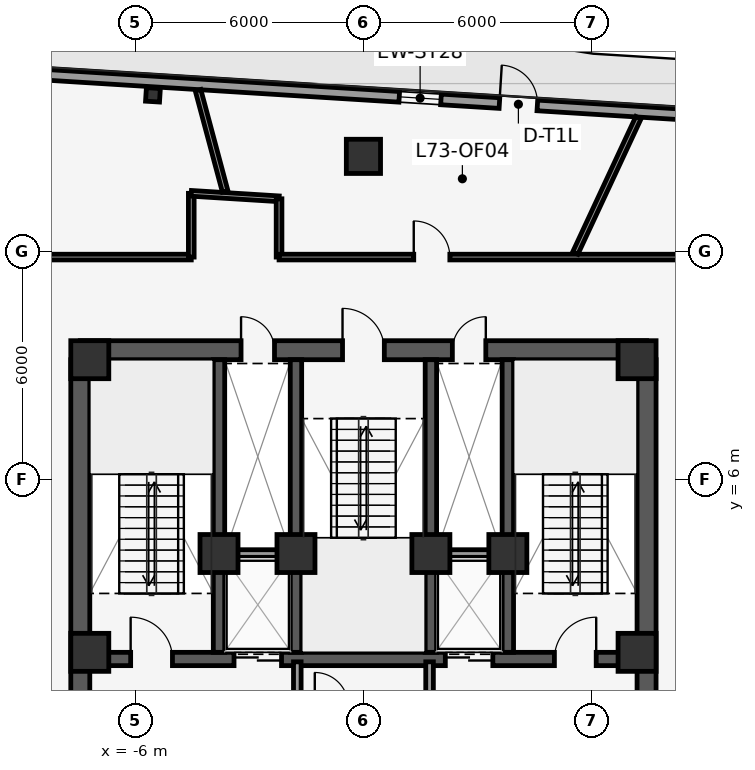
"""IFC4 building model, lengths in metres.
Left out: names, types, materials, properties, quantities, classifications, styles, units other than length and angle.
Written with IfcOpenShell. Run it as: python <this file> out.ifc"""

import sys

from ifc_helpers import new_model, si_unit, direction, frame, frame_2d, origin, origin_2d, place, context, subcontext, project, spatial, rectangle, i_section, extrude, element, fill, save


model = new_model("IFC4")
c1 = context("Model", 3, precision=1e-05, world=origin(), true_north=direction((0.0, 1.0)))
c2 = subcontext(c1, "Body", "Model", "MODEL_VIEW")
j1 = project(units=[si_unit("LENGTHUNIT", "METRE"), si_unit("PLANEANGLEUNIT", "RADIAN")], contexts=[c1])
p1 = place(None, origin())
s1 = spatial("IfcSite", under=j1, at=p1, CompositionType="ELEMENT")
p2 = place(p1, origin())
s2 = spatial("IfcBuilding", under=s1, at=p2, CompositionType="ELEMENT")
p3 = place(p2, frame((0.0, 0.0, 310.6)))
s3 = spatial("IfcBuildingStorey", under=s2, at=p3, CompositionType="ELEMENT", Elevation=310.6)
p4 = place(p3, frame((-7.45, 9.4, 0.0), z_axis=(0.0, 0.0, 1.0), x_axis=(1.0, 0.0, 0.0)))
e1 = element("IfcWall", 1, at=p4, inside=s3, PredefinedType="SHEAR", context=c2, shape_type="SweptSolid", body=[
    extrude(rectangle(XDim=14.9, YDim=0.5, at=frame_2d((7.45, 0.0))), origin(), (0.0, 0.0, 1.0), 3.85),
])
p5 = place(p4, frame((6.9, 0.0, 0.0)))
e2 = element("IfcOpeningElement", 2, at=p5, cuts=e1, PredefinedType="OPENING", context=c2, shape_type="SweptSolid", body=[
    extrude(rectangle(XDim=1.1, YDim=2.15, at=frame_2d((0.55, 1.075))), frame((0.0, 0.26, 0.0), z_axis=(0.0, -1.0, 0.0), x_axis=(1.0, 0.0, 0.0)), (0.0, 0.0, 1.0), 0.52),
])
p6 = place(p4, frame((4.23, 0.0, 0.0)))
e3 = element("IfcOpeningElement", 3, at=p6, cuts=e1, PredefinedType="OPENING", context=c2, shape_type="SweptSolid", body=[
    extrude(rectangle(XDim=0.88, YDim=2.15, at=frame_2d((0.44, 1.075))), frame((0.0, 0.26, 0.0), z_axis=(0.0, -1.0, 0.0), x_axis=(1.0, 0.0, 0.0)), (0.0, 0.0, 1.0), 0.52),
])
p7 = place(p4, frame((9.79, 0.0, 0.0)))
e4 = element("IfcOpeningElement", 4, at=p7, cuts=e1, PredefinedType="OPENING", context=c2, shape_type="SweptSolid", body=[
    extrude(rectangle(XDim=0.88, YDim=2.15, at=frame_2d((0.44, 1.075))), frame((0.0, 0.26, 0.0), z_axis=(0.0, -1.0, 0.0), x_axis=(1.0, 0.0, 0.0)), (0.0, 0.0, 1.0), 0.52),
])
p8 = place(p3, frame((-7.2, 1.275, 0.0), z_axis=(0.0, 0.0, 1.0), x_axis=(1.0, 0.0, 0.0)))
e5 = element("IfcWall", 5, at=p8, inside=s3, PredefinedType="SHEAR", context=c2, shape_type="SweptSolid", body=[
    extrude(rectangle(XDim=14.4, YDim=0.35, at=frame_2d((7.2, 0.0))), origin(), (0.0, 0.0, 1.0), 3.85),
])
p9 = place(p8, frame((3.795, 0.0, 0.0)))
e6 = element("IfcOpeningElement", 6, at=p9, cuts=e5, PredefinedType="OPENING", context=c2, shape_type="SweptSolid", body=[
    extrude(rectangle(XDim=1.25, YDim=2.25, at=frame_2d((0.625, 1.125))), frame((0.0, 0.185, 0.0), z_axis=(0.0, -1.0, 0.0), x_axis=(1.0, 0.0, 0.0)), (0.0, 0.0, 1.0), 0.37),
])
p10 = place(p8, frame((9.355, 0.0, 0.0)))
e7 = element("IfcOpeningElement", 7, at=p10, cuts=e5, PredefinedType="OPENING", context=c2, shape_type="SweptSolid", body=[
    extrude(rectangle(XDim=1.25, YDim=2.25, at=frame_2d((0.625, 1.125))), frame((0.0, 0.185, 0.0), z_axis=(0.0, -1.0, 0.0), x_axis=(1.0, 0.0, 0.0)), (0.0, 0.0, 1.0), 0.37),
])
p11 = place(p8, frame((1.075, 0.0, 0.0)))
e8 = element("IfcOpeningElement", 8, at=p11, cuts=e5, PredefinedType="OPENING", context=c2, shape_type="SweptSolid", body=[
    extrude(rectangle(XDim=1.1, YDim=2.15, at=frame_2d((0.55, 1.075))), frame((0.0, 0.185, 0.0), z_axis=(0.0, -1.0, 0.0), x_axis=(1.0, 0.0, 0.0)), (0.0, 0.0, 1.0), 0.37),
])
p12 = place(p8, frame((12.225, 0.0, 0.0)))
e9 = element("IfcOpeningElement", 9, at=p12, cuts=e5, PredefinedType="OPENING", context=c2, shape_type="SweptSolid", body=[
    extrude(rectangle(XDim=1.1, YDim=2.15, at=frame_2d((0.55, 1.075))), frame((0.0, 0.185, 0.0), z_axis=(0.0, -1.0, 0.0), x_axis=(1.0, 0.0, 0.0)), (0.0, 0.0, 1.0), 0.37),
])
for number, where, z_axis, x_axis in (
    (10, (-3.8, 1.45, 0.0), (0.0, 0.0, 1.0), (0.0, 1.0, 0.0)),
    (11, (-1.775, 1.45, 0.0), (0.0, 0.0, 1.0), (0.0, 1.0, 0.0)),
    (12, (1.775, 1.45, 0.0), (0.0, 0.0, 1.0), (0.0, 1.0, 0.0)),
    (13, (3.8, 1.45, 0.0), (0.0, 0.0, 1.0), (0.0, 1.0, 0.0)),
):
    element("IfcWall", number, at=place(p3, frame(where, z_axis=z_axis, x_axis=x_axis)), inside=s3, PredefinedType="SHEAR", context=c2, shape_type="SweptSolid", body=[
        extrude(rectangle(XDim=7.7, YDim=0.3, at=frame_2d((3.85, 0.0))), origin(), (0.0, 0.0, 1.0), 3.85),
    ])
for number, where, z_axis, x_axis in (
    (14, (-7.45, 0.1, 0.0), (0.0, 0.0, 1.0), (0.0, 1.0, 0.0)),
    (15, (7.45, 0.1, 0.0), (0.0, 0.0, 1.0), (0.0, 1.0, 0.0)),
):
    element("IfcWall", number, at=place(p3, frame(where, z_axis=z_axis, x_axis=x_axis)), inside=s3, PredefinedType="SHEAR", context=c2, shape_type="SweptSolid", body=[
        extrude(rectangle(XDim=9.05, YDim=0.5, at=frame_2d((4.525, 0.0))), origin(), (0.0, 0.0, 1.0), 3.85),
    ])
for number, where, z_axis, x_axis in (
    (16, (7.2, 1.45, 0.0), (0.0, 0.0, 1.0), (1.0, 0.0, 0.0)),
    (17, (7.2, 9.15, 0.0), (0.0, 0.0, 1.0), (1.0, 0.0, 0.0)),
    (18, (-7.2, 9.15, 0.0), (0.0, 0.0, 1.0), (1.0, 0.0, 0.0)),
    (19, (-7.2, 1.45, 0.0), (0.0, 0.0, 1.0), (1.0, 0.0, 0.0)),
    (20, (-3.8, 4.05, 0.0), (0.0, 0.0, 1.0), (1.0, 0.0, 0.0)),
    (21, (3.8, 4.05, 0.0), (0.0, 0.0, 1.0), (1.0, 0.0, 0.0)),
    (22, (-1.775, 4.05, 0.0), (0.0, 0.0, 1.0), (1.0, 0.0, 0.0)),
    (23, (1.775, 4.05, 0.0), (0.0, 0.0, 1.0), (1.0, 0.0, 0.0)),
):
    element("IfcColumn", number, at=place(p3, frame(where, z_axis=z_axis, x_axis=x_axis)), inside=s3, PredefinedType="COLUMN", context=c2, shape_type="SweptSolid", body=[
        extrude(rectangle(XDim=1.0, YDim=1.0, at=origin_2d()), origin(), (0.0, 0.0, 1.0), 4.1),
    ])
p13 = place(p3, frame((0.0, 14.5, 0.0), z_axis=(0.0, 0.0, 1.0), x_axis=(1.0, 0.0, 0.0)))
e24 = element("IfcColumn", 24, at=p13, inside=s3, PredefinedType="COLUMN", context=c2, shape_type="SweptSolid", body=[
    extrude(rectangle(XDim=0.9, YDim=0.9, at=origin_2d()), origin(), (0.0, 0.0, 1.0), 4.1),
])
p14 = place(p3, frame((-5.538, 16.118, 0.0), z_axis=(0.0, 0.0, 1.0), x_axis=(-0.998081143466, 0.061919553109, 0.0)))
e25 = element("IfcColumn", 25, at=p14, inside=s3, PredefinedType="COLUMN", context=c2, shape_type="SweptSolid", body=[
    extrude(i_section(OverallWidth=0.368, OverallDepth=0.356, WebThickness=0.011, FlangeThickness=0.018, at=origin_2d()), origin(), (0.0, 0.0, 1.0), 4.1),
])
p15 = place(p3, frame((-20.056, 17.376, 0.0), z_axis=(0.0, 0.0, 1.0), x_axis=(0.998061236898, -0.06223959674, 0.0)))
e26 = element("IfcWall", 26, at=p15, inside=s3, PredefinedType="STANDARD", context=c2, shape_type="SweptSolid", body=[
    extrude(rectangle(XDim=43.18, YDim=0.28, at=frame_2d((21.59, 0.0))), origin(), (0.0, 0.0, 1.0), 3.85),
])
p16 = place(p15, frame((23.681, 0.0, 0.0)))
e27 = element("IfcOpeningElement", 27, at=p16, cuts=e26, PredefinedType="OPENING", context=c2, shape_type="SweptSolid", body=[
    extrude(rectangle(XDim=1.0, YDim=2.15, at=frame_2d((0.5, 1.075))), frame((0.0, 0.15, 0.0), z_axis=(0.0, -1.0, 0.0), x_axis=(1.0, 0.0, 0.0)), (0.0, 0.0, 1.0), 0.3),
])
p17 = place(p15, frame((4.24, 0.0, 0.85)))
e28 = element("IfcOpeningElement", 28, at=p17, cuts=e26, PredefinedType="OPENING", context=c2, shape_type="SweptSolid", body=[
    extrude(rectangle(XDim=1.1, YDim=2.15, at=frame_2d((0.55, 1.075))), frame((0.0, 0.15, 0.0), z_axis=(0.0, -1.0, 0.0), x_axis=(1.0, 0.0, 0.0)), (0.0, 0.0, 1.0), 0.3),
])
p18 = place(p15, frame((9.84, 0.0, 0.85)))
e29 = element("IfcOpeningElement", 29, at=p18, cuts=e26, PredefinedType="OPENING", context=c2, shape_type="SweptSolid", body=[
    extrude(rectangle(XDim=1.1, YDim=2.15, at=frame_2d((0.55, 1.075))), frame((0.0, 0.15, 0.0), z_axis=(0.0, -1.0, 0.0), x_axis=(1.0, 0.0, 0.0)), (0.0, 0.0, 1.0), 0.3),
])
p19 = place(p15, frame((21.04, 0.0, 0.85)))
e30 = element("IfcOpeningElement", 30, at=p19, cuts=e26, PredefinedType="OPENING", context=c2, shape_type="SweptSolid", body=[
    extrude(rectangle(XDim=1.1, YDim=2.15, at=frame_2d((0.55, 1.075))), frame((0.0, 0.15, 0.0), z_axis=(0.0, -1.0, 0.0), x_axis=(1.0, 0.0, 0.0)), (0.0, 0.0, 1.0), 0.3),
])
p20 = place(p15, frame((32.24, 0.0, 0.85)))
e31 = element("IfcOpeningElement", 31, at=p20, cuts=e26, PredefinedType="OPENING", context=c2, shape_type="SweptSolid", body=[
    extrude(rectangle(XDim=1.1, YDim=2.15, at=frame_2d((0.55, 1.075))), frame((0.0, 0.15, 0.0), z_axis=(0.0, -1.0, 0.0), x_axis=(1.0, 0.0, 0.0)), (0.0, 0.0, 1.0), 0.3),
])
p21 = place(p15, frame((37.84, 0.0, 0.85)))
e32 = element("IfcOpeningElement", 32, at=p21, cuts=e26, PredefinedType="OPENING", context=c2, shape_type="SweptSolid", body=[
    extrude(rectangle(XDim=1.1, YDim=2.15, at=frame_2d((0.55, 1.075))), frame((0.0, 0.15, 0.0), z_axis=(0.0, -1.0, 0.0), x_axis=(1.0, 0.0, 0.0)), (0.0, 0.0, 1.0), 0.3),
])
p22 = place(p3, frame((25.8, 9.083, 0.0), z_axis=(0.0, 0.0, 1.0), x_axis=(-0.55919392155, -0.829036885851, 0.0)))
e33 = element("IfcWall", 33, at=p22, inside=s3, PredefinedType="STANDARD", context=c2, shape_type="SweptSolid", body=[
    extrude(rectangle(XDim=43.915, YDim=0.28, at=frame_2d((21.958, 0.0))), origin(), (0.0, 0.0, 1.0), 3.85),
])
p23 = place(p22, frame((21.457, 0.0, 0.0)))
e34 = element("IfcOpeningElement", 34, at=p23, cuts=e33, PredefinedType="OPENING", context=c2, shape_type="SweptSolid", body=[
    extrude(rectangle(XDim=1.0, YDim=2.15, at=frame_2d((0.5, 1.075))), frame((0.0, 0.15, 0.0), z_axis=(0.0, -1.0, 0.0), x_axis=(1.0, 0.0, 0.0)), (0.0, 0.0, 1.0), 0.3),
])
p24 = place(p22, frame((4.607, 0.0, 0.85)))
e35 = element("IfcOpeningElement", 35, at=p24, cuts=e33, PredefinedType="OPENING", context=c2, shape_type="SweptSolid", body=[
    extrude(rectangle(XDim=1.1, YDim=2.15, at=frame_2d((0.55, 1.075))), frame((0.0, 0.15, 0.0), z_axis=(0.0, -1.0, 0.0), x_axis=(1.0, 0.0, 0.0)), (0.0, 0.0, 1.0), 0.3),
])
p25 = place(p22, frame((15.807, 0.0, 0.85)))
e36 = element("IfcOpeningElement", 36, at=p25, cuts=e33, PredefinedType="OPENING", context=c2, shape_type="SweptSolid", body=[
    extrude(rectangle(XDim=1.1, YDim=2.15, at=frame_2d((0.55, 1.075))), frame((0.0, 0.15, 0.0), z_axis=(0.0, -1.0, 0.0), x_axis=(1.0, 0.0, 0.0)), (0.0, 0.0, 1.0), 0.3),
])
p26 = place(p22, frame((27.007, 0.0, 0.85)))
e37 = element("IfcOpeningElement", 37, at=p26, cuts=e33, PredefinedType="OPENING", context=c2, shape_type="SweptSolid", body=[
    extrude(rectangle(XDim=1.1, YDim=2.15, at=frame_2d((0.55, 1.075))), frame((0.0, 0.15, 0.0), z_axis=(0.0, -1.0, 0.0), x_axis=(1.0, 0.0, 0.0)), (0.0, 0.0, 1.0), 0.3),
])
p27 = place(p22, frame((32.607, 0.0, 0.85)))
e38 = element("IfcOpeningElement", 38, at=p27, cuts=e33, PredefinedType="OPENING", context=c2, shape_type="SweptSolid", body=[
    extrude(rectangle(XDim=1.1, YDim=2.15, at=frame_2d((0.55, 1.075))), frame((0.0, 0.15, 0.0), z_axis=(0.0, -1.0, 0.0), x_axis=(1.0, 0.0, 0.0)), (0.0, 0.0, 1.0), 0.3),
])
p28 = place(p22, frame((38.207, 0.0, 0.85)))
e39 = element("IfcOpeningElement", 39, at=p28, cuts=e33, PredefinedType="OPENING", context=c2, shape_type="SweptSolid", body=[
    extrude(rectangle(XDim=1.1, YDim=2.15, at=frame_2d((0.55, 1.075))), frame((0.0, 0.15, 0.0), z_axis=(0.0, -1.0, 0.0), x_axis=(1.0, 0.0, 0.0)), (0.0, 0.0, 1.0), 0.3),
])
p29 = place(p3, frame((-4.988, -26.865, 0.0), z_axis=(0.0, 0.0, 1.0), x_axis=(-0.431592936847, 0.902068476815, 0.0)))
e40 = element("IfcWall", 40, at=p29, inside=s3, PredefinedType="STANDARD", context=c2, shape_type="SweptSolid", body=[
    extrude(rectangle(XDim=43.18, YDim=0.28, at=frame_2d((21.59, 0.0))), origin(), (0.0, 0.0, 1.0), 3.85),
])
p30 = place(p29, frame((4.24, 0.0, 0.85)))
e41 = element("IfcOpeningElement", 41, at=p30, cuts=e40, PredefinedType="OPENING", context=c2, shape_type="SweptSolid", body=[
    extrude(rectangle(XDim=1.1, YDim=2.15, at=frame_2d((0.55, 1.075))), frame((0.0, 0.15, 0.0), z_axis=(0.0, -1.0, 0.0), x_axis=(1.0, 0.0, 0.0)), (0.0, 0.0, 1.0), 0.3),
])
p31 = place(p29, frame((9.84, 0.0, 0.85)))
e42 = element("IfcOpeningElement", 42, at=p31, cuts=e40, PredefinedType="OPENING", context=c2, shape_type="SweptSolid", body=[
    extrude(rectangle(XDim=1.1, YDim=2.15, at=frame_2d((0.55, 1.075))), frame((0.0, 0.15, 0.0), z_axis=(0.0, -1.0, 0.0), x_axis=(1.0, 0.0, 0.0)), (0.0, 0.0, 1.0), 0.3),
])
p32 = place(p29, frame((32.24, 0.0, 0.85)))
e43 = element("IfcOpeningElement", 43, at=p32, cuts=e40, PredefinedType="OPENING", context=c2, shape_type="SweptSolid", body=[
    extrude(rectangle(XDim=1.1, YDim=2.15, at=frame_2d((0.55, 1.075))), frame((0.0, 0.15, 0.0), z_axis=(0.0, -1.0, 0.0), x_axis=(1.0, 0.0, 0.0)), (0.0, 0.0, 1.0), 0.3),
])
p33 = place(p29, frame((37.84, 0.0, 0.85)))
e44 = element("IfcOpeningElement", 44, at=p33, cuts=e40, PredefinedType="OPENING", context=c2, shape_type="SweptSolid", body=[
    extrude(rectangle(XDim=1.1, YDim=2.15, at=frame_2d((0.55, 1.075))), frame((0.0, 0.15, 0.0), z_axis=(0.0, -1.0, 0.0), x_axis=(1.0, 0.0, 0.0)), (0.0, 0.0, 1.0), 0.3),
])
for number, where, z_axis, x_axis in (
    (45, (-3.65, 4.05, 0.0), (0.0, 0.0, 1.0), (1.0, 0.0, 0.0)),
    (46, (1.92, 4.05, 0.0), (0.0, 0.0, 1.0), (1.0, 0.0, 0.0)),
):
    element("IfcWall", number, at=place(p3, frame(where, z_axis=z_axis, x_axis=x_axis)), inside=s3, PredefinedType="PARTITIONING", context=c2, shape_type="SweptSolid", body=[
        extrude(rectangle(XDim=1.73, YDim=0.2, at=frame_2d((0.865, 0.0))), origin(), (0.0, 0.0, 1.0), 3.85),
    ])
p34 = place(p3, frame((-1.74, -1.78, 0.0), z_axis=(0.0, 0.0, 1.0), x_axis=(0.0, 1.0, 0.0)))
e47 = element("IfcWall", 47, at=p34, inside=s3, PredefinedType="PARTITIONING", context=c2, shape_type="SweptSolid", body=[
    extrude(rectangle(XDim=2.98, YDim=0.2, at=frame_2d((1.49, 0.0))), origin(), (0.0, 0.0, 1.0), 3.85),
])
p35 = place(p34, frame((0.42, 0.0, 0.0)))
e48 = element("IfcOpeningElement", 48, at=p35, cuts=e47, PredefinedType="OPENING", context=c2, shape_type="SweptSolid", body=[
    extrude(rectangle(XDim=0.88, YDim=2.15, at=frame_2d((0.44, 1.075))), frame((0.0, 0.11, 0.0), z_axis=(0.0, -1.0, 0.0), x_axis=(1.0, 0.0, 0.0)), (0.0, 0.0, 1.0), 0.22),
])
p36 = place(p3, frame((1.74, -1.78, 0.0), z_axis=(0.0, 0.0, 1.0), x_axis=(0.0, 1.0, 0.0)))
e49 = element("IfcWall", 49, at=p36, inside=s3, PredefinedType="PARTITIONING", context=c2, shape_type="SweptSolid", body=[
    extrude(rectangle(XDim=2.98, YDim=0.2, at=frame_2d((1.49, 0.0))), origin(), (0.0, 0.0, 1.0), 3.85),
])
p37 = place(p36, frame((0.42, 0.0, 0.0)))
e50 = element("IfcOpeningElement", 50, at=p37, cuts=e49, PredefinedType="OPENING", context=c2, shape_type="SweptSolid", body=[
    extrude(rectangle(XDim=0.88, YDim=2.15, at=frame_2d((0.44, 1.075))), frame((0.0, 0.11, 0.0), z_axis=(0.0, -1.0, 0.0), x_axis=(1.0, 0.0, 0.0)), (0.0, 0.0, 1.0), 0.22),
])
p38 = place(p3, frame((-9.9, 11.85, 0.0), z_axis=(0.0, 0.0, 1.0), x_axis=(1.0, 0.0, 0.0)))
e51 = element("IfcWall", 51, at=p38, inside=s3, PredefinedType="PARTITIONING", context=c2, shape_type="SweptSolid", body=[
    extrude(rectangle(XDim=5.37, YDim=0.15, at=frame_2d((2.685, 0.0))), origin(), (0.0, 0.0, 1.0), 3.85),
])
p39 = place(p3, frame((-4.53, 11.85, 0.0), z_axis=(0.0, 0.0, 1.0), x_axis=(0.0, 1.0, 0.0)))
e52 = element("IfcWall", 52, at=p39, inside=s3, PredefinedType="PARTITIONING", context=c2, shape_type="SweptSolid", body=[
    extrude(rectangle(XDim=1.677, YDim=0.15, at=frame_2d((0.839, 0.0))), origin(), (0.0, 0.0, 1.0), 3.85),
])
p40 = place(p3, frame((-4.53, 13.527, 0.0), z_axis=(0.0, 0.0, 1.0), x_axis=(0.998061597532, -0.062233813416, 0.0)))
e53 = element("IfcWall", 53, at=p40, inside=s3, PredefinedType="PARTITIONING", context=c2, shape_type="SweptSolid", body=[
    extrude(rectangle(XDim=2.314, YDim=0.15, at=frame_2d((1.157, 0.0))), origin(), (0.0, 0.0, 1.0), 3.85),
])
p41 = place(p3, frame((-2.22, 13.383, 0.0), z_axis=(0.0, 0.0, 1.0), x_axis=(0.0, -1.0, 0.0)))
e54 = element("IfcWall", 54, at=p41, inside=s3, PredefinedType="PARTITIONING", context=c2, shape_type="SweptSolid", body=[
    extrude(rectangle(XDim=1.533, YDim=0.15, at=frame_2d((0.767, 0.0))), origin(), (0.0, 0.0, 1.0), 3.85),
])
p42 = place(p3, frame((-2.22, 11.85, 0.0), z_axis=(0.0, 0.0, 1.0), x_axis=(1.0, 0.0, 0.0)))
e55 = element("IfcWall", 55, at=p42, inside=s3, PredefinedType="PARTITIONING", context=c2, shape_type="SweptSolid", body=[
    extrude(rectangle(XDim=12.12, YDim=0.15, at=frame_2d((6.06, 0.0))), origin(), (0.0, 0.0, 1.0), 3.85),
])
p43 = place(p42, frame((3.544, 0.0, 0.0)))
e56 = element("IfcOpeningElement", 56, at=p43, cuts=e55, PredefinedType="OPENING", context=c2, shape_type="SweptSolid", body=[
    extrude(rectangle(XDim=0.95, YDim=2.15, at=frame_2d((0.475, 1.075))), frame((0.0, 0.085, 0.0), z_axis=(0.0, -1.0, 0.0), x_axis=(1.0, 0.0, 0.0)), (0.0, 0.0, 1.0), 0.17),
])
p44 = place(p3, frame((5.575, 11.955, 0.0), z_axis=(0.0, 0.0, 1.0), x_axis=(0.422633924121, 0.906300483384, 0.0)))
e57 = element("IfcWall", 57, at=p44, inside=s3, PredefinedType="PARTITIONING", context=c2, shape_type="SweptSolid", body=[
    extrude(rectangle(XDim=3.932, YDim=0.15, at=frame_2d((1.966, 0.0))), origin(), (0.0, 0.0, 1.0), 3.85),
])
p45 = place(p3, frame((-3.638, 13.577, 0.0), z_axis=(0.0, 0.0, 1.0), x_axis=(-0.258764100705, 0.965940546921, 0.0)))
e58 = element("IfcWall", 58, at=p45, inside=s3, PredefinedType="PARTITIONING", context=c2, shape_type="SweptSolid", body=[
    extrude(rectangle(XDim=2.759, YDim=0.15, at=frame_2d((1.379, 0.0))), origin(), (0.0, 0.0, 1.0), 3.85),
])
p46 = place(p16, origin())
e59 = element("IfcDoor", 59, at=p46, inside=s3, OperationType="SINGLE_SWING_LEFT", PredefinedType="DOOR", context=c2, shape_type="SweptSolid", body=[
    extrude(rectangle(XDim=1.0, YDim=2.15, at=frame_2d((0.5, 1.075))), frame((0.0, 0.025, 0.0), z_axis=(0.0, -1.0, 0.0), x_axis=(1.0, 0.0, 0.0)), (0.0, 0.0, 1.0), 0.05),
])
fill(e27, e59)
p47 = place(p19, origin())
e60 = element("IfcWindow", 60, at=p47, inside=s3, PartitioningType="SINGLE_PANEL", PredefinedType="WINDOW", context=c2, shape_type="SweptSolid", body=[
    extrude(rectangle(XDim=1.1, YDim=2.15, at=frame_2d((0.55, 1.075))), frame((0.0, 0.03, 0.0), z_axis=(0.0, -1.0, 0.0), x_axis=(1.0, 0.0, 0.0)), (0.0, 0.0, 1.0), 0.06),
])
fill(e30, e60)
p48 = place(p9, origin())
e61 = element("IfcDoor", 61, at=p48, inside=s3, OperationType="DOUBLE_DOOR_SLIDING", PredefinedType="DOOR", context=c2, shape_type="SweptSolid", body=[
    extrude(rectangle(XDim=1.25, YDim=2.25, at=frame_2d((0.625, 1.125))), frame((0.0, 0.025, 0.0), z_axis=(0.0, -1.0, 0.0), x_axis=(1.0, 0.0, 0.0)), (0.0, 0.0, 1.0), 0.05),
])
fill(e6, e61)
p49 = place(p10, origin())
e62 = element("IfcDoor", 62, at=p49, inside=s3, OperationType="DOUBLE_DOOR_SLIDING", PredefinedType="DOOR", context=c2, shape_type="SweptSolid", body=[
    extrude(rectangle(XDim=1.25, YDim=2.25, at=frame_2d((0.625, 1.125))), frame((0.0, 0.025, 0.0), z_axis=(0.0, -1.0, 0.0), x_axis=(1.0, 0.0, 0.0)), (0.0, 0.0, 1.0), 0.05),
])
fill(e7, e62)
p50 = place(p11, origin())
e63 = element("IfcDoor", 63, at=p50, inside=s3, OperationType="SINGLE_SWING_LEFT", PredefinedType="DOOR", context=c2, shape_type="SweptSolid", body=[
    extrude(rectangle(XDim=1.1, YDim=2.15, at=frame_2d((0.55, 1.075))), frame((0.0, 0.025, 0.0), z_axis=(0.0, -1.0, 0.0), x_axis=(1.0, 0.0, 0.0)), (0.0, 0.0, 1.0), 0.05),
])
fill(e8, e63)
p51 = place(p12, origin())
e64 = element("IfcDoor", 64, at=p51, inside=s3, OperationType="SINGLE_SWING_RIGHT", PredefinedType="DOOR", context=c2, shape_type="SweptSolid", body=[
    extrude(rectangle(XDim=1.1, YDim=2.15, at=frame_2d((0.55, 1.075))), frame((0.0, 0.025, 0.0), z_axis=(0.0, -1.0, 0.0), x_axis=(1.0, 0.0, 0.0)), (0.0, 0.0, 1.0), 0.05),
])
fill(e9, e64)
p52 = place(p5, origin())
e65 = element("IfcDoor", 65, at=p52, inside=s3, OperationType="SINGLE_SWING_LEFT", PredefinedType="DOOR", context=c2, shape_type="SweptSolid", body=[
    extrude(rectangle(XDim=1.1, YDim=2.15, at=frame_2d((0.55, 1.075))), frame((0.0, 0.025, 0.0), z_axis=(0.0, -1.0, 0.0), x_axis=(1.0, 0.0, 0.0)), (0.0, 0.0, 1.0), 0.05),
])
fill(e2, e65)
p53 = place(p6, origin())
e66 = element("IfcDoor", 66, at=p53, inside=s3, OperationType="SINGLE_SWING_LEFT", PredefinedType="DOOR", context=c2, shape_type="SweptSolid", body=[
    extrude(rectangle(XDim=0.88, YDim=2.15, at=frame_2d((0.44, 1.075))), frame((0.0, 0.025, 0.0), z_axis=(0.0, -1.0, 0.0), x_axis=(1.0, 0.0, 0.0)), (0.0, 0.0, 1.0), 0.05),
])
fill(e3, e66)
p54 = place(p7, origin())
e67 = element("IfcDoor", 67, at=p54, inside=s3, OperationType="SINGLE_SWING_RIGHT", PredefinedType="DOOR", context=c2, shape_type="SweptSolid", body=[
    extrude(rectangle(XDim=0.88, YDim=2.15, at=frame_2d((0.44, 1.075))), frame((0.0, 0.025, 0.0), z_axis=(0.0, -1.0, 0.0), x_axis=(1.0, 0.0, 0.0)), (0.0, 0.0, 1.0), 0.05),
])
fill(e4, e67)
p55 = place(p43, origin())
e68 = element("IfcDoor", 68, at=p55, inside=s3, OperationType="SINGLE_SWING_LEFT", PredefinedType="DOOR", context=c2, shape_type="SweptSolid", body=[
    extrude(rectangle(XDim=0.95, YDim=2.15, at=frame_2d((0.475, 1.075))), frame((0.0, 0.025, 0.0), z_axis=(0.0, -1.0, 0.0), x_axis=(1.0, 0.0, 0.0)), (0.0, 0.0, 1.0), 0.05),
])
fill(e56, e68)
save(model, sys.argv[1])
